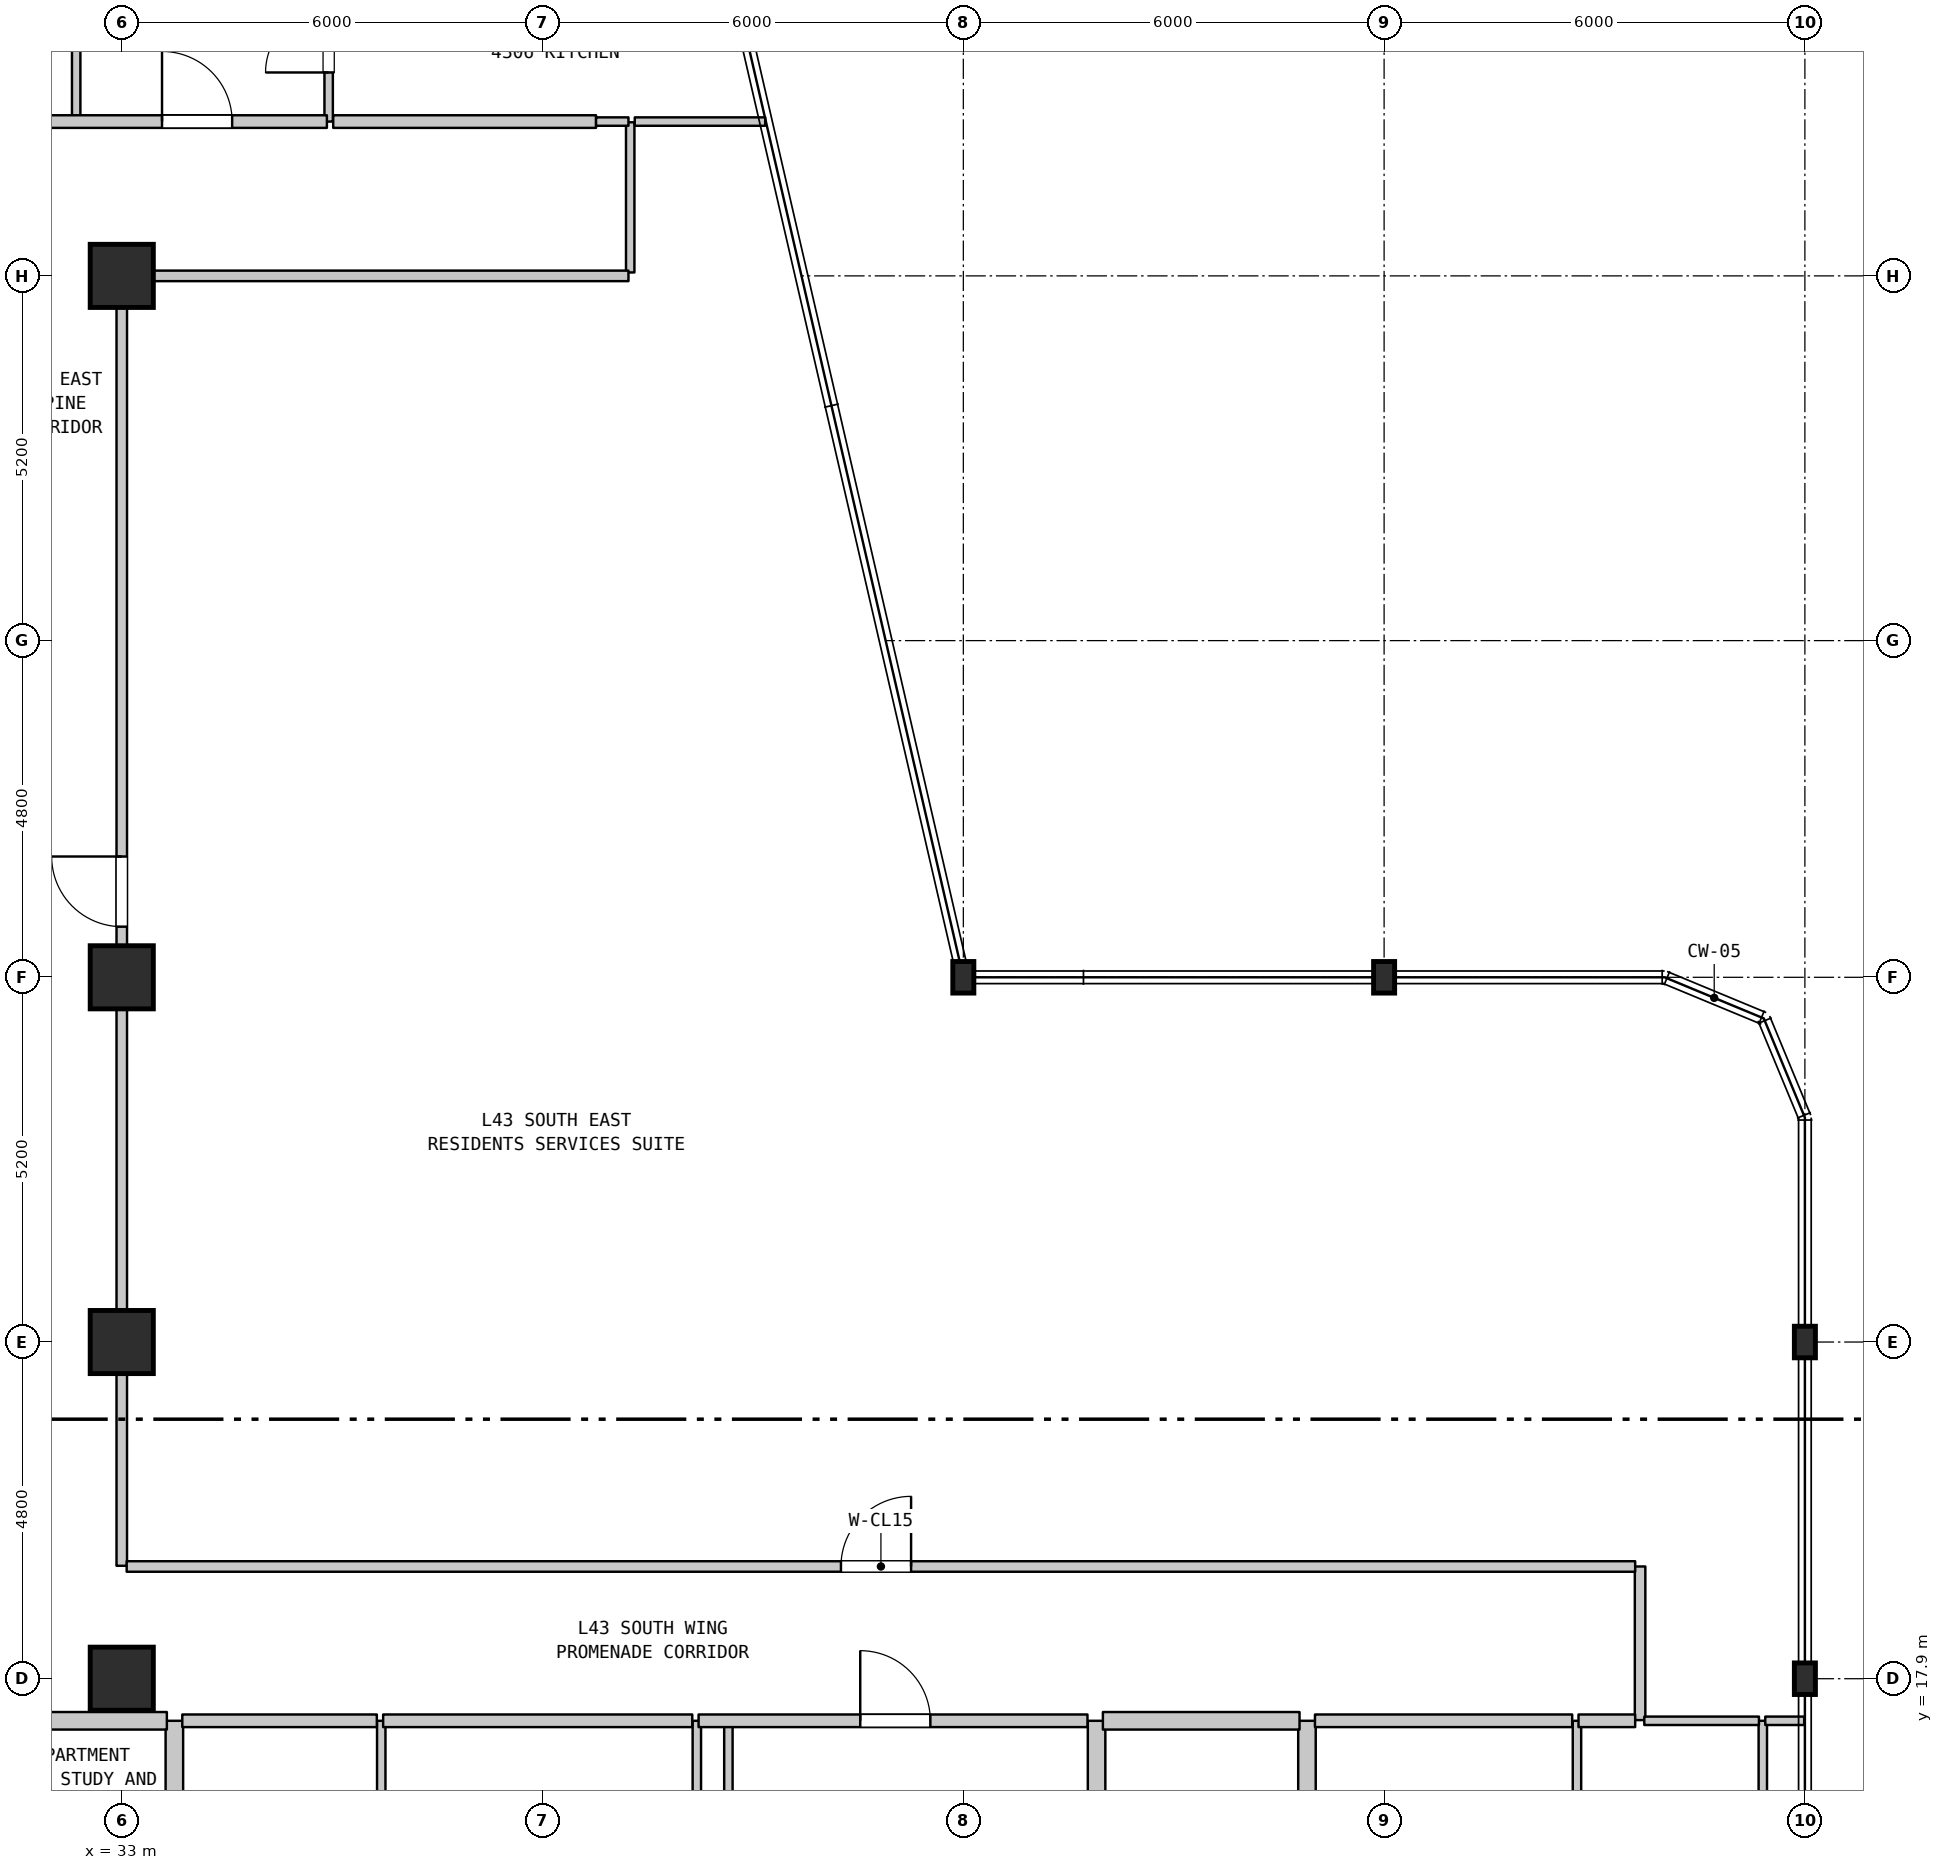
"""IFC4 building model, lengths in metres.
Left out: names, types, materials, properties, quantities, classifications, styles, units other than length and angle.
Written with IfcOpenShell. Run it as: python <this file> out.ifc"""

import sys

from ifc_helpers import new_model, si_unit, direction, frame, frame_2d, origin, origin_2d, place, context, subcontext, project, spatial, rectangle, i_section, extrude, element, fill, save


model = new_model("IFC4")
c1 = context("Model", 3, precision=1e-05, world=origin(), true_north=direction((0.0, 1.0)))
c2 = subcontext(c1, "Body", "Model", "MODEL_VIEW")
j1 = project(units=[si_unit("LENGTHUNIT", "METRE"), si_unit("PLANEANGLEUNIT", "RADIAN")], contexts=[c1])
p1 = place(None, origin())
s1 = spatial("IfcSite", under=j1, at=p1, CompositionType="ELEMENT")
p2 = place(p1, origin())
s2 = spatial("IfcBuilding", under=s1, at=p2, CompositionType="ELEMENT")
p3 = place(p2, frame((0.0, 0.0, 176.5)))
s3 = spatial("IfcBuildingStorey", under=s2, at=p3, CompositionType="ELEMENT", Elevation=176.5)
for number, where, z_axis, x_axis in (
    (1, (33.0, 17.9, 0.0), (0.0, 0.0, 1.0), (1.0, 0.0, 0.0)),
    (2, (33.0, 22.7, 0.0), (0.0, 0.0, 1.0), (1.0, 0.0, 0.0)),
    (3, (33.0, 27.9, 0.0), (0.0, 0.0, 1.0), (1.0, 0.0, 0.0)),
    (4, (33.0, 37.9, 0.0), (0.0, 0.0, 1.0), (1.0, 0.0, 0.0)),
):
    element("IfcColumn", number, at=place(p3, frame(where, z_axis=z_axis, x_axis=x_axis)), inside=s3, PredefinedType="COLUMN", context=c2, shape_type="SweptSolid", body=[
        extrude(rectangle(XDim=0.9, YDim=0.9, at=origin_2d()), origin(), (0.0, 0.0, 1.0), 3.7),
    ])
for number, where, z_axis, x_axis in (
    (5, (45.0, 27.9, 0.0), (0.0, 0.0, 1.0), (1.0, 0.0, 0.0)),
    (6, (51.0, 27.9, 0.0), (0.0, 0.0, 1.0), (1.0, 0.0, 0.0)),
    (7, (57.0, 17.9, 0.0), (0.0, 0.0, 1.0), (1.0, 0.0, 0.0)),
    (8, (57.0, 22.7, 0.0), (0.0, 0.0, 1.0), (1.0, 0.0, 0.0)),
):
    element("IfcColumn", number, at=place(p3, frame(where, z_axis=z_axis, x_axis=x_axis)), inside=s3, PredefinedType="COLUMN", context=c2, shape_type="SweptSolid", body=[
        extrude(i_section(OverallWidth=0.3, OverallDepth=0.45, WebThickness=0.014, FlangeThickness=0.026, FilletRadius=0.027, at=origin_2d()), origin(), (0.0, 0.0, 1.0), 3.7),
    ])
p4 = place(p3, frame((32.35, 40.1, 0.0), z_axis=(0.0, 0.0, 1.0), x_axis=(0.0, 1.0, 0.0)))
e9 = element("IfcWall", 9, at=p4, inside=s3, PredefinedType="PARTITIONING", context=c2, shape_type="SweptSolid", body=[
    extrude(rectangle(XDim=13.79, YDim=0.12, at=frame_2d((6.895, 0.0))), origin(), (0.0, 0.0, 1.0), 3.39),
])
p5 = place(p3, frame((33.0, 19.51, 0.0), z_axis=(0.0, 0.0, 1.0), x_axis=(0.0, 1.0, 0.0)))
e10 = element("IfcWall", 10, at=p5, inside=s3, PredefinedType="STANDARD", context=c2, shape_type="SweptSolid", body=[
    extrude(rectangle(XDim=8.39, YDim=0.15, at=frame_2d((4.195, 0.0))), origin(), (0.0, 0.0, 1.0), 2.99),
])
p6 = place(p3, frame((33.75, 11.15, 0.0), z_axis=(0.0, 0.0, 1.0), x_axis=(0.0, 1.0, 0.0)))
e11 = element("IfcWall", 11, at=p6, inside=s3, PredefinedType="STANDARD", context=c2, shape_type="SweptSolid", body=[
    extrude(rectangle(XDim=6.15, YDim=0.25, at=frame_2d((3.075, 0.0))), origin(), (0.0, 0.0, 1.0), 3.39),
])
p7 = place(p3, frame((35.95, 40.1, 0.0), z_axis=(0.0, 0.0, 1.0), x_axis=(0.0, 1.0, 0.0)))
e12 = element("IfcWall", 12, at=p7, inside=s3, PredefinedType="PARTITIONING", context=c2, shape_type="SweptSolid", body=[
    extrude(rectangle(XDim=2.3, YDim=0.12, at=frame_2d((1.15, 0.0))), origin(), (0.0, 0.0, 1.0), 3.39),
])
p8 = place(p7, frame((0.7, 0.0, 0.0)))
e13 = element("IfcOpeningElement", 13, at=p8, cuts=e12, PredefinedType="OPENING", context=c2, shape_type="SweptSolid", body=[
    extrude(rectangle(XDim=0.9, YDim=2.15, at=frame_2d((0.45, 1.075))), frame((0.0, 0.07, 0.0), z_axis=(0.0, -1.0, 0.0), x_axis=(1.0, 0.0, 0.0)), (0.0, 0.0, 1.0), 0.14),
])
p9 = place(p3, frame((36.7, 11.15, 0.0), z_axis=(0.0, 0.0, 1.0), x_axis=(0.0, 1.0, 0.0)))
e14 = element("IfcWall", 14, at=p9, inside=s3, PredefinedType="PARTITIONING", context=c2, shape_type="SweptSolid", body=[
    extrude(rectangle(XDim=6.15, YDim=0.12, at=frame_2d((3.075, 0.0))), origin(), (0.0, 0.0, 1.0), 3.39),
])
p10 = place(p3, frame((40.25, 37.949, 0.0), z_axis=(0.0, 0.0, 1.0), x_axis=(0.0, 1.0, 0.0)))
e15 = element("IfcWall", 15, at=p10, inside=s3, PredefinedType="PARTITIONING", context=c2, shape_type="SweptSolid", body=[
    extrude(rectangle(XDim=2.141, YDim=0.12, at=frame_2d((1.071, 0.0))), origin(), (0.0, 0.0, 1.0), 3.39),
])
p11 = place(p3, frame((41.2, 11.15, 0.0), z_axis=(0.0, 0.0, 1.0), x_axis=(0.0, 1.0, 0.0)))
e16 = element("IfcWall", 16, at=p11, inside=s3, PredefinedType="PARTITIONING", context=c2, shape_type="SweptSolid", body=[
    extrude(rectangle(XDim=6.15, YDim=0.12, at=frame_2d((3.075, 0.0))), origin(), (0.0, 0.0, 1.0), 3.39),
])
p12 = place(p3, frame((41.65, 14.85, 0.0), z_axis=(0.0, 0.0, 1.0), x_axis=(0.0, 1.0, 0.0)))
e17 = element("IfcWall", 17, at=p12, inside=s3, PredefinedType="PARTITIONING", context=c2, shape_type="SweptSolid", body=[
    extrude(rectangle(XDim=2.45, YDim=0.12, at=frame_2d((1.225, 0.0))), origin(), (0.0, 0.0, 1.0), 3.39),
])
for number, where, z_axis, x_axis in (
    (18, (46.9, 11.15, 0.0), (0.0, 0.0, 1.0), (0.0, 1.0, 0.0)),
    (19, (49.9, 11.15, 0.0), (0.0, 0.0, 1.0), (0.0, 1.0, 0.0)),
):
    element("IfcWall", number, at=place(p3, frame(where, z_axis=z_axis, x_axis=x_axis)), inside=s3, PredefinedType="STANDARD", context=c2, shape_type="SweptSolid", body=[
        extrude(rectangle(XDim=6.15, YDim=0.25, at=frame_2d((3.075, 0.0))), origin(), (0.0, 0.0, 1.0), 3.39),
    ])
p13 = place(p3, frame((53.75, 11.15, 0.0), z_axis=(0.0, 0.0, 1.0), x_axis=(0.0, 1.0, 0.0)))
e20 = element("IfcWall", 20, at=p13, inside=s3, PredefinedType="PARTITIONING", context=c2, shape_type="SweptSolid", body=[
    extrude(rectangle(XDim=6.15, YDim=0.12, at=frame_2d((3.075, 0.0))), origin(), (0.0, 0.0, 1.0), 3.39),
])
p14 = place(p3, frame((54.65, 17.31, 0.0), z_axis=(0.0, 0.0, 1.0), x_axis=(0.0, 1.0, 0.0)))
e21 = element("IfcWall", 21, at=p14, inside=s3, PredefinedType="STANDARD", context=c2, shape_type="SweptSolid", body=[
    extrude(rectangle(XDim=2.19, YDim=0.15, at=frame_2d((1.095, 0.0))), origin(), (0.0, 0.0, 1.0), 3.39),
])
p15 = place(p3, frame((56.4, 11.15, 0.0), z_axis=(0.0, 0.0, 1.0), x_axis=(0.0, 1.0, 0.0)))
e22 = element("IfcWall", 22, at=p15, inside=s3, PredefinedType="PARTITIONING", context=c2, shape_type="SweptSolid", body=[
    extrude(rectangle(XDim=6.15, YDim=0.12, at=frame_2d((3.075, 0.0))), origin(), (0.0, 0.0, 1.0), 3.39),
])
p16 = place(p3, frame((30.83, 17.3, 0.0), z_axis=(0.0, 0.0, 1.0), x_axis=(1.0, 0.0, 0.0)))
e23 = element("IfcWall", 23, at=p16, inside=s3, PredefinedType="STANDARD", context=c2, shape_type="SweptSolid", body=[
    extrude(rectangle(XDim=2.813, YDim=0.25, at=frame_2d((1.406, 0.0))), origin(), (0.0, 0.0, 1.0), 3.39),
])
p17 = place(p3, frame((33.863, 17.3, 0.0), z_axis=(0.0, 0.0, 1.0), x_axis=(1.0, 0.0, 0.0)))
e24 = element("IfcWall", 24, at=p17, inside=s3, PredefinedType="STANDARD", context=c2, shape_type="SweptSolid", body=[
    extrude(rectangle(XDim=2.774, YDim=0.18, at=frame_2d((1.387, 0.0))), origin(), (0.0, 0.0, 1.0), 3.39),
])
p18 = place(p3, frame((36.727, 17.3, 0.0), z_axis=(0.0, 0.0, 1.0), x_axis=(1.0, 0.0, 0.0)))
e25 = element("IfcWall", 25, at=p18, inside=s3, PredefinedType="STANDARD", context=c2, shape_type="SweptSolid", body=[
    extrude(rectangle(XDim=4.408, YDim=0.18, at=frame_2d((2.204, 0.0))), origin(), (0.0, 0.0, 1.0), 3.39),
])
p19 = place(p3, frame((41.225, 17.3, 0.0), z_axis=(0.0, 0.0, 1.0), x_axis=(1.0, 0.0, 0.0)))
e26 = element("IfcWall", 26, at=p19, inside=s3, PredefinedType="STANDARD", context=c2, shape_type="SweptSolid", body=[
    extrude(rectangle(XDim=5.545, YDim=0.18, at=frame_2d((2.772, 0.0))), origin(), (0.0, 0.0, 1.0), 3.39),
])
p20 = place(p19, frame((2.305, 0.0, 0.0)))
e27 = element("IfcOpeningElement", 27, at=p20, cuts=e26, PredefinedType="OPENING", context=c2, shape_type="SweptSolid", body=[
    extrude(rectangle(XDim=1.0, YDim=2.15, at=frame_2d((0.5, 1.075))), frame((0.0, 0.1, 0.0), z_axis=(0.0, -1.0, 0.0), x_axis=(1.0, 0.0, 0.0)), (0.0, 0.0, 1.0), 0.2),
])
p21 = place(p3, frame((46.99, 17.3, 0.0), z_axis=(0.0, 0.0, 1.0), x_axis=(1.0, 0.0, 0.0)))
e28 = element("IfcWall", 28, at=p21, inside=s3, PredefinedType="STANDARD", context=c2, shape_type="SweptSolid", body=[
    extrude(rectangle(XDim=2.804, YDim=0.25, at=frame_2d((1.402, 0.0))), origin(), (0.0, 0.0, 1.0), 3.39),
])
p22 = place(p3, frame((50.014, 17.3, 0.0), z_axis=(0.0, 0.0, 1.0), x_axis=(1.0, 0.0, 0.0)))
e29 = element("IfcWall", 29, at=p22, inside=s3, PredefinedType="STANDARD", context=c2, shape_type="SweptSolid", body=[
    extrude(rectangle(XDim=3.668, YDim=0.18, at=frame_2d((1.834, 0.0))), origin(), (0.0, 0.0, 1.0), 3.39),
])
p23 = place(p3, frame((53.772, 17.3, 0.0), z_axis=(0.0, 0.0, 1.0), x_axis=(1.0, 0.0, 0.0)))
e30 = element("IfcWall", 30, at=p23, inside=s3, PredefinedType="STANDARD", context=c2, shape_type="SweptSolid", body=[
    extrude(rectangle(XDim=0.808, YDim=0.18, at=frame_2d((0.404, 0.0))), origin(), (0.0, 0.0, 1.0), 3.39),
])
p24 = place(p3, frame((54.71, 17.3, 0.0), z_axis=(0.0, 0.0, 1.0), x_axis=(1.0, 0.0, 0.0)))
e31 = element("IfcWall", 31, at=p24, inside=s3, PredefinedType="PARTITIONING", context=c2, shape_type="SweptSolid", body=[
    extrude(rectangle(XDim=1.635, YDim=0.12, at=frame_2d((0.817, 0.0))), origin(), (0.0, 0.0, 1.0), 3.39),
])
p25 = place(p3, frame((56.435, 17.3, 0.0), z_axis=(0.0, 0.0, 1.0), x_axis=(1.0, 0.0, 0.0)))
e32 = element("IfcWall", 32, at=p25, inside=s3, PredefinedType="PARTITIONING", context=c2, shape_type="SweptSolid", body=[
    extrude(rectangle(XDim=0.555, YDim=0.12, at=frame_2d((0.277, 0.0))), origin(), (0.0, 0.0, 1.0), 3.39),
])
p26 = place(p3, frame((33.07, 19.5, 0.0), z_axis=(0.0, 0.0, 1.0), x_axis=(1.0, 0.0, 0.0)))
e33 = element("IfcWall", 33, at=p26, inside=s3, PredefinedType="STANDARD", context=c2, shape_type="SweptSolid", body=[
    extrude(rectangle(XDim=21.51, YDim=0.15, at=frame_2d((10.755, 0.0))), origin(), (0.0, 0.0, 1.0), 3.39),
])
p27 = place(p26, frame((10.185, 0.0, 0.0)))
e34 = element("IfcOpeningElement", 34, at=p27, cuts=e33, PredefinedType="OPENING", context=c2, shape_type="SweptSolid", body=[
    extrude(rectangle(XDim=1.0, YDim=2.15, at=frame_2d((0.5, 1.075))), frame((0.0, 0.085, 0.0), z_axis=(0.0, -1.0, 0.0), x_axis=(1.0, 0.0, 0.0)), (0.0, 0.0, 1.0), 0.17),
])
p28 = place(p3, frame((33.07, 37.9, 0.0), z_axis=(0.0, 0.0, 1.0), x_axis=(1.0, 0.0, 0.0)))
e35 = element("IfcWall", 35, at=p28, inside=s3, PredefinedType="STANDARD", context=c2, shape_type="SweptSolid", body=[
    extrude(rectangle(XDim=7.155, YDim=0.15, at=frame_2d((3.578, 0.0))), origin(), (0.0, 0.0, 1.0), 3.39),
])
p29 = place(p3, frame((31.965, 40.1, 0.0), z_axis=(0.0, 0.0, 1.0), x_axis=(1.0, 0.0, 0.0)))
e36 = element("IfcWall", 36, at=p29, inside=s3, PredefinedType="STANDARD", context=c2, shape_type="SweptSolid", body=[
    extrude(rectangle(XDim=3.96, YDim=0.18, at=frame_2d((1.98, 0.0))), origin(), (0.0, 0.0, 1.0), 3.39),
])
p30 = place(p29, frame((1.609, 0.0, 0.0)))
e37 = element("IfcOpeningElement", 37, at=p30, cuts=e36, PredefinedType="OPENING", context=c2, shape_type="SweptSolid", body=[
    extrude(rectangle(XDim=1.0, YDim=2.15, at=frame_2d((0.5, 1.075))), frame((0.0, 0.1, 0.0), z_axis=(0.0, -1.0, 0.0), x_axis=(1.0, 0.0, 0.0)), (0.0, 0.0, 1.0), 0.2),
])
p31 = place(p3, frame((36.015, 40.1, 0.0), z_axis=(0.0, 0.0, 1.0), x_axis=(1.0, 0.0, 0.0)))
e38 = element("IfcWall", 38, at=p31, inside=s3, PredefinedType="STANDARD", context=c2, shape_type="SweptSolid", body=[
    extrude(rectangle(XDim=3.748, YDim=0.18, at=frame_2d((1.874, 0.0))), origin(), (0.0, 0.0, 1.0), 3.39),
])
p32 = place(p3, frame((39.763, 40.1, 0.0), z_axis=(0.0, 0.0, 1.0), x_axis=(1.0, 0.0, 0.0)))
e39 = element("IfcWall", 39, at=p32, inside=s3, PredefinedType="PARTITIONING", context=c2, shape_type="SweptSolid", body=[
    extrude(rectangle(XDim=0.462, YDim=0.12, at=frame_2d((0.231, 0.0))), origin(), (0.0, 0.0, 1.0), 3.39),
])
p33 = place(p3, frame((40.315, 40.1, 0.0), z_axis=(0.0, 0.0, 1.0), x_axis=(1.0, 0.0, 0.0)))
e40 = element("IfcWall", 40, at=p33, inside=s3, PredefinedType="PARTITIONING", context=c2, shape_type="SweptSolid", body=[
    extrude(rectangle(XDim=1.86, YDim=0.12, at=frame_2d((0.93, 0.0))), origin(), (0.0, 0.0, 1.0), 3.39),
])
p34 = place(p3, frame((33.0, 27.9, 0.0), z_axis=(0.0, 0.0, 1.0), x_axis=(0.0, 1.0, 0.0)))
e41 = element("IfcWall", 41, at=p34, inside=s3, PredefinedType="STANDARD", context=c2, shape_type="SweptSolid", body=[
    extrude(rectangle(XDim=9.99, YDim=0.15, at=frame_2d((4.995, 0.0))), origin(), (0.0, 0.0, 1.0), 2.89),
])
p35 = place(p34, frame((0.722, 0.0, 0.0)))
e42 = element("IfcOpeningElement", 42, at=p35, cuts=e41, PredefinedType="OPENING", context=c2, shape_type="SweptSolid", body=[
    extrude(rectangle(XDim=1.0, YDim=2.15, at=frame_2d((0.5, 1.075))), frame((0.0, 0.085, 0.0), z_axis=(0.0, -1.0, 0.0), x_axis=(1.0, 0.0, 0.0)), (0.0, 0.0, 1.0), 0.17),
])
p36 = place(p35, origin())
e43 = element("IfcDoor", 43, at=p36, inside=s3, OperationType="SINGLE_SWING_RIGHT", PredefinedType="DOOR", context=c2, shape_type="SweptSolid", body=[
    extrude(rectangle(XDim=1.0, YDim=2.15, at=frame_2d((0.5, 1.075))), frame((0.0, 0.025, 0.0), z_axis=(0.0, -1.0, 0.0), x_axis=(1.0, 0.0, 0.0)), (0.0, 0.0, 1.0), 0.05),
])
fill(e42, e43)
p37 = place(p8, origin())
e44 = element("IfcDoor", 44, at=p37, inside=s3, OperationType="SINGLE_SWING_LEFT", PredefinedType="DOOR", context=c2, shape_type="SweptSolid", body=[
    extrude(rectangle(XDim=0.9, YDim=2.15, at=frame_2d((0.45, 1.075))), frame((0.0, 0.025, 0.0), z_axis=(0.0, -1.0, 0.0), x_axis=(1.0, 0.0, 0.0)), (0.0, 0.0, 1.0), 0.05),
])
fill(e13, e44)
p38 = place(p20, origin())
e45 = element("IfcDoor", 45, at=p38, inside=s3, OperationType="SINGLE_SWING_LEFT", PredefinedType="DOOR", context=c2, shape_type="SweptSolid", body=[
    extrude(rectangle(XDim=1.0, YDim=2.15, at=frame_2d((0.5, 1.075))), frame((0.0, 0.025, 0.0), z_axis=(0.0, -1.0, 0.0), x_axis=(1.0, 0.0, 0.0)), (0.0, 0.0, 1.0), 0.05),
])
fill(e27, e45)
p39 = place(p27, origin())
e46 = element("IfcDoor", 46, at=p39, inside=s3, OperationType="SINGLE_SWING_RIGHT", PredefinedType="DOOR", context=c2, shape_type="SweptSolid", body=[
    extrude(rectangle(XDim=1.0, YDim=2.15, at=frame_2d((0.5, 1.075))), frame((0.0, 0.025, 0.0), z_axis=(0.0, -1.0, 0.0), x_axis=(1.0, 0.0, 0.0)), (0.0, 0.0, 1.0), 0.05),
])
fill(e34, e46)
p40 = place(p30, origin())
e47 = element("IfcDoor", 47, at=p40, inside=s3, OperationType="SINGLE_SWING_LEFT", PredefinedType="DOOR", context=c2, shape_type="SweptSolid", body=[
    extrude(rectangle(XDim=1.0, YDim=2.15, at=frame_2d((0.5, 1.075))), frame((0.0, 0.025, 0.0), z_axis=(0.0, -1.0, 0.0), x_axis=(1.0, 0.0, 0.0)), (0.0, 0.0, 1.0), 0.05),
])
fill(e37, e47)
save(model, sys.argv[1])
